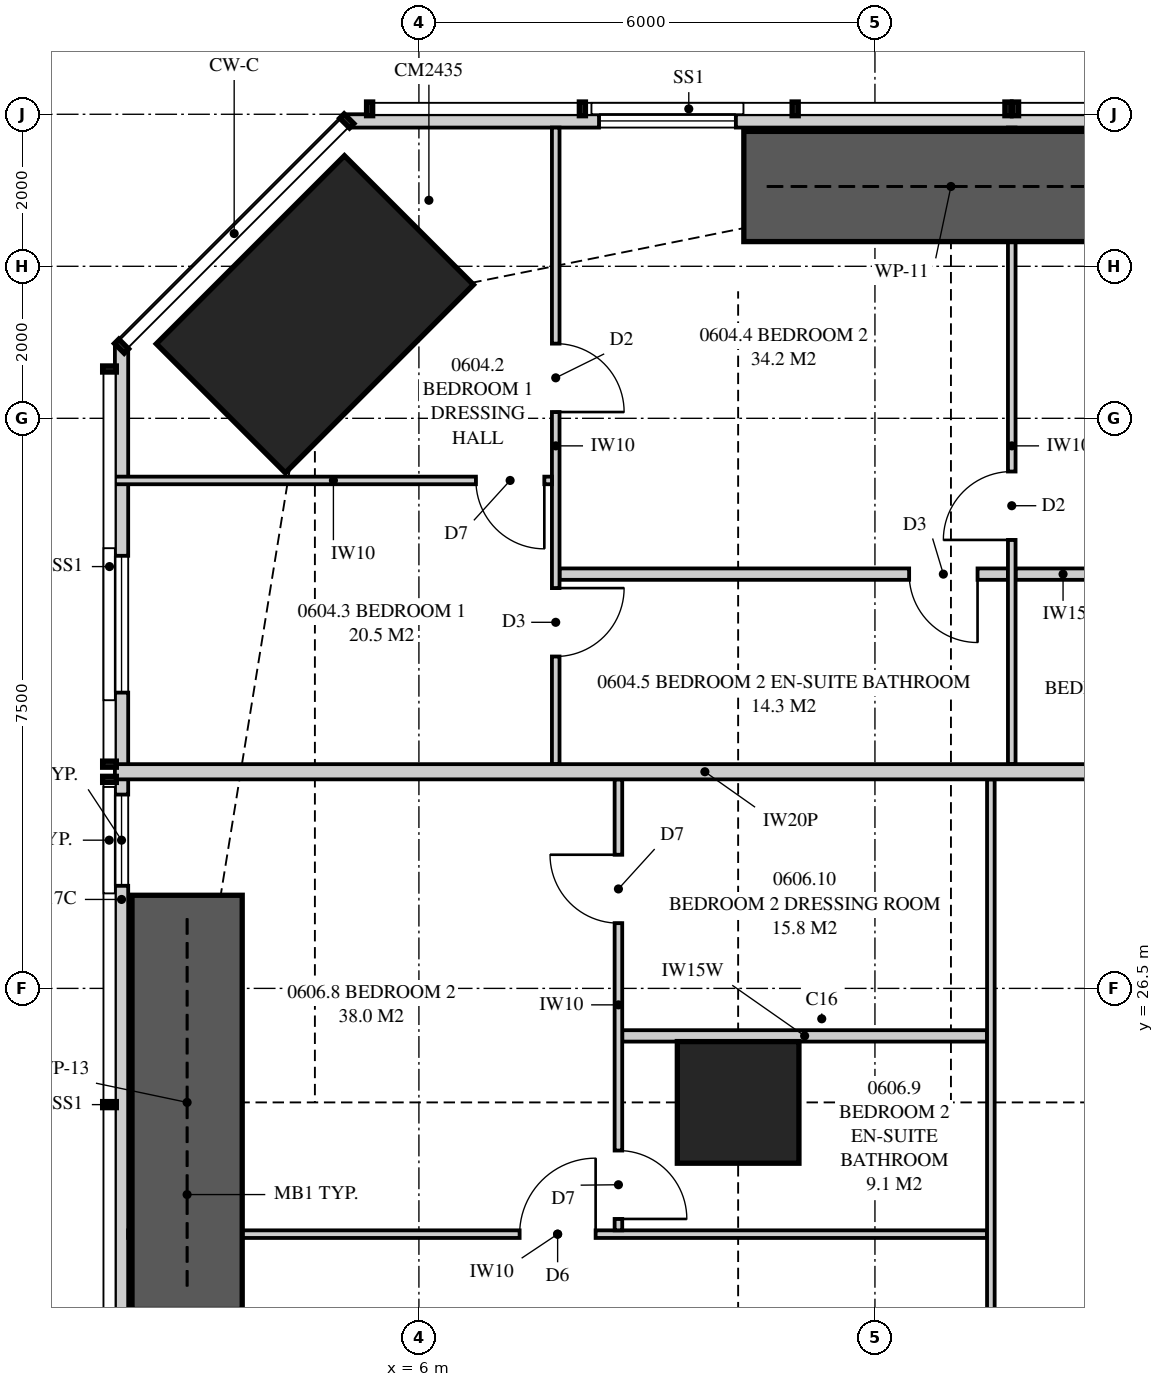
"""IFC4 building model, lengths in metres.
Left out: names, types, materials, properties, quantities, classifications, styles, units other than length and angle.
Written with IfcOpenShell. Run it as: python <this file> out.ifc"""

import sys

from ifc_helpers import new_model, si_unit, direction, frame, frame_2d, origin, origin_2d, place, context, subcontext, project, spatial, polyline, rectangle, outline, extrude, element, fill, save


model = new_model("IFC4")
c1 = context("Model", 3, precision=1e-05, world=origin(), true_north=direction((0.0, 1.0)))
c2 = subcontext(c1, "Body", "Model", "MODEL_VIEW")
j1 = project(units=[si_unit("LENGTHUNIT", "METRE"), si_unit("PLANEANGLEUNIT", "RADIAN")], contexts=[c1])
p1 = place(None, origin())
s1 = spatial("IfcSite", under=j1, at=p1, CompositionType="ELEMENT")
p2 = place(p1, origin())
s2 = spatial("IfcBuilding", under=s1, at=p2, CompositionType="ELEMENT")
p3 = place(p2, frame((0.0, 0.0, 27.7)))
s3 = spatial("IfcBuildingStorey", under=s2, at=p3, CompositionType="ELEMENT", Elevation=27.7)
p4 = place(p3, frame((4.631, 35.369, 0.0), z_axis=(0.0, 0.0, 1.0), x_axis=(0.707106781187, -0.707106781187, 0.0)))
e1 = element("IfcColumn", 1, at=p4, inside=s3, PredefinedType="COLUMN", context=c2, shape_type="SweptSolid", body=[
    extrude(rectangle(XDim=2.4, YDim=3.5, at=origin_2d()), origin(), (0.0, 0.0, 1.0), 3.35),
])
p5 = place(p3, frame((10.2, 25.0, 0.0), z_axis=(0.0, 0.0, 1.0), x_axis=(1.0, 0.0, 0.0)))
e2 = element("IfcColumn", 2, at=p5, inside=s3, PredefinedType="COLUMN", context=c2, shape_type="SweptSolid", body=[
    extrude(rectangle(XDim=1.6, YDim=1.6, at=origin_2d()), origin(), (0.0, 0.0, 1.0), 3.35),
])
p6 = place(p3, frame((26.783, 37.913, 0.0), z_axis=(0.0, 0.0, 1.0), x_axis=(-1.0, 0.0, 0.0)))
e3 = element("IfcWall", 3, at=p6, inside=s3, PredefinedType="SOLIDWALL", context=c2, shape_type="SweptSolid", body=[
    extrude(outline(polyline([(0.0, 0.0), (21.732, 0.0), (21.732, 3.11), (13.987, 3.11), (13.987, 2.15), (13.939, 2.15), (13.939, 3.11), (13.783, 3.11), (13.783, 2.15), (0.0, 2.15), (0.0, 0.0)])), frame((0.0, 0.087, 0.0), z_axis=(0.0, -1.0, 0.0), x_axis=(1.0, 0.0, 0.0)), (0.0, 0.0, 1.0), 0.175),
])
p7 = place(p6, frame((6.258, 0.0, 0.4)))
e4 = element("IfcOpeningElement", 4, at=p7, cuts=e3, PredefinedType="OPENING", context=c2, shape_type="SweptSolid", body=[
    extrude(rectangle(XDim=1.8, YDim=1.7, at=frame_2d((0.9, 0.85))), frame((0.0, 0.097, 0.0), z_axis=(0.0, -1.0, 0.0), x_axis=(1.0, 0.0, 0.0)), (0.0, 0.0, 1.0), 0.195),
])
p8 = place(p6, frame((9.126, 0.0, 0.4)))
e5 = element("IfcOpeningElement", 5, at=p8, cuts=e3, PredefinedType="OPENING", context=c2, shape_type="SweptSolid", body=[
    extrude(rectangle(XDim=1.8, YDim=1.7, at=frame_2d((0.9, 0.85))), frame((0.0, 0.097, 0.0), z_axis=(0.0, -1.0, 0.0), x_axis=(1.0, 0.0, 0.0)), (0.0, 0.0, 1.0), 0.195),
])
p9 = place(p6, frame((16.613, 0.0, 0.4)))
e6 = element("IfcOpeningElement", 6, at=p9, cuts=e3, PredefinedType="OPENING", context=c2, shape_type="SweptSolid", body=[
    extrude(rectangle(XDim=1.8, YDim=1.7, at=frame_2d((0.9, 0.85))), frame((0.0, 0.097, 0.0), z_axis=(0.0, -1.0, 0.0), x_axis=(1.0, 0.0, 0.0)), (0.0, 0.0, 1.0), 0.195),
])
p10 = place(p3, frame((2.087, 34.949, 0.0), z_axis=(0.0, 0.0, 1.0), x_axis=(0.0, -1.0, 0.0)))
e7 = element("IfcWall", 7, at=p10, inside=s3, PredefinedType="SOLIDWALL", context=c2, shape_type="SweptSolid", body=[
    extrude(outline(polyline([(0.0, 0.0), (14.557, 0.0), (14.557, 2.15), (9.949, 2.15), (9.949, 3.11), (9.823, 3.11), (9.823, 2.15), (9.73, 2.15), (9.73, 3.11), (0.0, 3.11), (0.0, 0.0)])), frame((0.0, 0.087, 0.0), z_axis=(0.0, -1.0, 0.0), x_axis=(1.0, 0.0, 0.0)), (0.0, 0.0, 1.0), 0.175),
])
p11 = place(p10, frame((2.757, 0.0, 0.4)))
e8 = element("IfcOpeningElement", 8, at=p11, cuts=e7, PredefinedType="OPENING", context=c2, shape_type="SweptSolid", body=[
    extrude(rectangle(XDim=1.8, YDim=1.7, at=frame_2d((0.9, 0.85))), frame((0.0, 0.097, 0.0), z_axis=(0.0, -1.0, 0.0), x_axis=(1.0, 0.0, 0.0)), (0.0, 0.0, 1.0), 0.195),
])
p12 = place(p10, frame((5.899, 0.0, 0.4)))
e9 = element("IfcOpeningElement", 9, at=p12, cuts=e7, PredefinedType="OPENING", context=c2, shape_type="SweptSolid", body=[
    extrude(rectangle(XDim=1.2, YDim=1.7, at=frame_2d((0.6, 0.85))), frame((0.0, 0.097, 0.0), z_axis=(0.0, -1.0, 0.0), x_axis=(1.0, 0.0, 0.0)), (0.0, 0.0, 1.0), 0.195),
])
p13 = place(p3, frame((7.8, 37.825, 0.0), z_axis=(0.0, 0.0, 1.0), x_axis=(0.0, -1.0, 0.0)))
e10 = element("IfcWall", 10, at=p13, inside=s3, PredefinedType="PARTITIONING", context=c2, shape_type="SweptSolid", body=[
    extrude(outline(polyline([(0.0, 0.0), (8.375, 0.0), (8.375, 3.11), (2.697, 3.11), (2.697, 2.15), (0.943, 2.15), (0.943, 3.11), (0.0, 3.11), (0.0, 0.0)])), frame((0.0, 0.05, 0.0), z_axis=(0.0, -1.0, 0.0), x_axis=(1.0, 0.0, 0.0)), (0.0, 0.0, 1.0), 0.1),
])
p14 = place(p13, frame((2.842, 0.0, 0.0)))
e11 = element("IfcOpeningElement", 11, at=p14, cuts=e10, PredefinedType="OPENING", context=c2, shape_type="SweptSolid", body=[
    extrude(rectangle(XDim=0.9, YDim=2.1, at=frame_2d((0.45, 1.05))), frame((0.0, 0.06, 0.0), z_axis=(0.0, -1.0, 0.0), x_axis=(1.0, 0.0, 0.0)), (0.0, 0.0, 1.0), 0.12),
])
p15 = place(p13, frame((6.059, 0.0, 0.0)))
e12 = element("IfcOpeningElement", 12, at=p15, cuts=e10, PredefinedType="OPENING", context=c2, shape_type="SweptSolid", body=[
    extrude(rectangle(XDim=0.9, YDim=2.1, at=frame_2d((0.45, 1.05))), frame((0.0, 0.06, 0.0), z_axis=(0.0, -1.0, 0.0), x_axis=(1.0, 0.0, 0.0)), (0.0, 0.0, 1.0), 0.12),
])
p16 = place(p3, frame((13.8, 37.825, 0.0), z_axis=(0.0, 0.0, 1.0), x_axis=(0.0, -1.0, 0.0)))
e13 = element("IfcWall", 13, at=p16, inside=s3, PredefinedType="PARTITIONING", context=c2, shape_type="SweptSolid", body=[
    extrude(outline(polyline([(1.635, 2.15), (0.0, 2.15), (0.0, 0.0), (8.375, 0.0), (8.375, 3.11), (1.635, 3.11), (1.635, 2.15)]), holes=[polyline([(1.021, 0.126), (0.529, 0.126), (0.529, 0.919), (1.021, 0.919), (1.021, 0.126)]), polyline([(1.021, 1.231), (0.529, 1.231), (0.529, 2.024), (1.021, 2.024), (1.021, 1.231)])]), frame((0.0, 0.05, 0.0), z_axis=(0.0, -1.0, 0.0), x_axis=(1.0, 0.0, 0.0)), (0.0, 0.0, 1.0), 0.1),
])
p17 = place(p16, frame((4.525, 0.0, 0.0)))
e14 = element("IfcOpeningElement", 14, at=p17, cuts=e13, PredefinedType="OPENING", context=c2, shape_type="SweptSolid", body=[
    extrude(rectangle(XDim=0.9, YDim=2.1, at=frame_2d((0.45, 1.05))), frame((0.0, 0.06, 0.0), z_axis=(0.0, -1.0, 0.0), x_axis=(1.0, 0.0, 0.0)), (0.0, 0.0, 1.0), 0.12),
])
p18 = place(p3, frame((2.0, 33.183, 0.0), z_axis=(0.0, 0.0, 1.0), x_axis=(1.0, 0.0, 0.0)))
e15 = element("IfcWall", 15, at=p18, inside=s3, PredefinedType="PARTITIONING", context=c2, shape_type="SweptSolid", body=[
    extrude(outline(polyline([(0.0, 0.0), (5.75, 0.0), (5.75, 3.11), (3.148, 3.11), (3.148, 2.15), (1.406, 2.15), (1.406, 3.11), (0.0, 3.11), (0.0, 0.0)])), frame((0.0, 0.05, 0.0), z_axis=(0.0, -1.0, 0.0), x_axis=(1.0, 0.0, 0.0)), (0.0, 0.0, 1.0), 0.1),
])
p19 = place(p18, frame((4.75, 0.0, 0.0)))
e16 = element("IfcOpeningElement", 16, at=p19, cuts=e15, PredefinedType="OPENING", context=c2, shape_type="SweptSolid", body=[
    extrude(rectangle(XDim=0.9, YDim=2.1, at=frame_2d((0.45, 1.05))), frame((0.0, 0.06, 0.0), z_axis=(0.0, -1.0, 0.0), x_axis=(1.0, 0.0, 0.0)), (0.0, 0.0, 1.0), 0.12),
])
p20 = place(p3, frame((7.85, 31.95, 0.0), z_axis=(0.0, 0.0, 1.0), x_axis=(1.0, 0.0, 0.0)))
e17 = element("IfcWall", 17, at=p20, inside=s3, PredefinedType="PLUMBINGWALL", context=c2, shape_type="SweptSolid", body=[
    extrude(outline(polyline([(0.0, 0.0), (5.9, 0.0), (5.9, 3.11), (5.462, 3.11), (5.462, 2.541), (4.838, 2.541), (4.838, 3.11), (3.635, 3.11), (3.635, 2.51), (1.065, 2.51), (1.065, 3.11), (0.0, 3.11), (0.0, 0.0)])), frame((0.0, 0.075, 0.0), z_axis=(0.0, -1.0, 0.0), x_axis=(1.0, 0.0, 0.0)), (0.0, 0.0, 1.0), 0.15),
])
p21 = place(p20, frame((4.6, 0.0, 0.0)))
e18 = element("IfcOpeningElement", 18, at=p21, cuts=e17, PredefinedType="OPENING", context=c2, shape_type="SweptSolid", body=[
    extrude(rectangle(XDim=0.9, YDim=2.1, at=frame_2d((0.45, 1.05))), frame((0.0, 0.085, 0.0), z_axis=(0.0, -1.0, 0.0), x_axis=(1.0, 0.0, 0.0)), (0.0, 0.0, 1.0), 0.17),
])
p22 = place(p3, frame((13.85, 31.95, 0.0), z_axis=(0.0, 0.0, 1.0), x_axis=(1.0, 0.0, 0.0)))
e19 = element("IfcWall", 19, at=p22, inside=s3, PredefinedType="PLUMBINGWALL", context=c2, shape_type="SweptSolid", body=[
    extrude(rectangle(XDim=4.2, YDim=0.15, at=frame_2d((2.1, 0.0))), origin(), (0.0, 0.0, 1.0), 3.11),
])
p23 = place(p22, frame((2.9, 0.0, 0.0)))
e20 = element("IfcOpeningElement", 20, at=p23, cuts=e19, PredefinedType="OPENING", context=c2, shape_type="SweptSolid", body=[
    extrude(rectangle(XDim=0.9, YDim=2.1, at=frame_2d((0.45, 1.05))), frame((0.0, 0.085, 0.0), z_axis=(0.0, -1.0, 0.0), x_axis=(1.0, 0.0, 0.0)), (0.0, 0.0, 1.0), 0.17),
])
p24 = place(p3, frame((2.0, 29.35, 0.0), z_axis=(0.0, 0.0, 1.0), x_axis=(1.0, 0.0, 0.0)))
e21 = element("IfcWall", 21, at=p24, inside=s3, PredefinedType="PARTITIONING", context=c2, shape_type="SweptSolid", body=[
    extrude(outline(polyline([(0.0, 0.0), (15.525, 0.0), (15.525, 3.11), (11.337, 3.11), (11.337, 2.541), (10.663, 2.541), (10.663, 3.11), (9.51, 3.11), (9.51, 2.51), (6.89, 2.51), (6.89, 3.11), (2.969, 3.11), (2.969, 2.541), (2.577, 2.541), (2.577, 2.15), (0.733, 2.15), (0.733, 3.11), (0.0, 3.11), (0.0, 0.0)])), frame((0.0, 0.1, 0.0), z_axis=(0.0, -1.0, 0.0), x_axis=(1.0, 0.0, 0.0)), (0.0, 0.0, 1.0), 0.2),
])
p25 = place(p3, frame((13.525, 11.3, 0.0), z_axis=(0.0, 0.0, 1.0), x_axis=(0.0, 1.0, 0.0)))
e22 = element("IfcWall", 22, at=p25, inside=s3, PredefinedType="PARTITIONING", context=c2, shape_type="SweptSolid", body=[
    extrude(outline(polyline([(0.0, 0.0), (17.95, 0.0), (17.95, 3.11), (13.987, 3.11), (13.987, 2.541), (13.413, 2.541), (13.413, 3.11), (1.987, 3.11), (1.987, 2.541), (1.413, 2.541), (1.413, 3.11), (0.0, 3.11), (0.0, 0.0)])), frame((0.0, 0.05, 0.0), z_axis=(0.0, -1.0, 0.0), x_axis=(1.0, 0.0, 0.0)), (0.0, 0.0, 1.0), 0.1),
])
p26 = place(p25, frame((6.7, 0.0, 0.0)))
e23 = element("IfcOpeningElement", 23, at=p26, cuts=e22, PredefinedType="OPENING", context=c2, shape_type="SweptSolid", body=[
    extrude(rectangle(XDim=1.0, YDim=2.1, at=frame_2d((0.5, 1.05))), frame((0.0, 0.06, 0.0), z_axis=(0.0, -1.0, 0.0), x_axis=(1.0, 0.0, 0.0)), (0.0, 0.0, 1.0), 0.12),
])
p27 = place(p3, frame((2.175, 23.267, 0.0), z_axis=(0.0, 0.0, 1.0), x_axis=(1.0, 0.0, 0.0)))
e24 = element("IfcWall", 24, at=p27, inside=s3, PredefinedType="PARTITIONING", context=c2, shape_type="SweptSolid", body=[
    extrude(outline(polyline([(0.529, 2.15), (0.0, 2.15), (0.0, 0.0), (0.529, 0.0), (0.529, 0.274), (1.021, 0.274), (1.021, 0.0), (11.3, 0.0), (11.3, 3.11), (9.285, 3.11), (9.285, 2.51), (6.765, 2.51), (6.765, 3.11), (1.635, 3.11), (1.635, 2.15), (1.021, 2.15), (1.021, 1.876), (0.529, 1.876), (0.529, 2.15)])), frame((0.0, 0.05, 0.0), z_axis=(0.0, -1.0, 0.0), x_axis=(1.0, 0.0, 0.0)), (0.0, 0.0, 1.0), 0.1),
])
p28 = place(p27, frame((5.15, 0.0, 0.0)))
e25 = element("IfcOpeningElement", 25, at=p28, cuts=e24, PredefinedType="OPENING", context=c2, shape_type="SweptSolid", body=[
    extrude(rectangle(XDim=1.0, YDim=2.1, at=frame_2d((0.5, 1.05))), frame((0.0, 0.06, 0.0), z_axis=(0.0, -1.0, 0.0), x_axis=(1.0, 0.0, 0.0)), (0.0, 0.0, 1.0), 0.12),
])
p29 = place(p3, frame((8.625, 23.317, 0.0), z_axis=(0.0, 0.0, 1.0), x_axis=(0.0, 1.0, 0.0)))
e26 = element("IfcWall", 26, at=p29, inside=s3, PredefinedType="PARTITIONING", context=c2, shape_type="SweptSolid", body=[
    extrude(outline(polyline([(0.0, 0.0), (5.933, 0.0), (5.933, 3.11), (1.971, 3.11), (1.971, 2.541), (1.396, 2.541), (1.396, 3.11), (0.0, 3.11), (0.0, 0.0)])), frame((0.0, 0.05, 0.0), z_axis=(0.0, -1.0, 0.0), x_axis=(1.0, 0.0, 0.0)), (0.0, 0.0, 1.0), 0.1),
])
p30 = place(p29, frame((0.15, 0.0, 0.0)))
e27 = element("IfcOpeningElement", 27, at=p30, cuts=e26, PredefinedType="OPENING", context=c2, shape_type="SweptSolid", body=[
    extrude(rectangle(XDim=0.9, YDim=2.1, at=frame_2d((0.45, 1.05))), frame((0.0, 0.06, 0.0), z_axis=(0.0, -1.0, 0.0), x_axis=(1.0, 0.0, 0.0)), (0.0, 0.0, 1.0), 0.12),
])
p31 = place(p29, frame((4.042, 0.0, 0.0)))
e28 = element("IfcOpeningElement", 28, at=p31, cuts=e26, PredefinedType="OPENING", context=c2, shape_type="SweptSolid", body=[
    extrude(rectangle(XDim=0.9, YDim=2.1, at=frame_2d((0.45, 1.05))), frame((0.0, 0.06, 0.0), z_axis=(0.0, -1.0, 0.0), x_axis=(1.0, 0.0, 0.0)), (0.0, 0.0, 1.0), 0.12),
])
p32 = place(p3, frame((8.675, 25.875, 0.0), z_axis=(0.0, 0.0, 1.0), x_axis=(1.0, 0.0, 0.0)))
e29 = element("IfcWall", 29, at=p32, inside=s3, PredefinedType="PLUMBINGWALL", context=c2, shape_type="SweptSolid", body=[
    extrude(outline(polyline([(0.0, 0.0), (4.8, 0.0), (4.8, 3.11), (4.637, 3.11), (4.637, 2.541), (4.013, 2.541), (4.013, 3.11), (2.81, 3.11), (2.81, 2.51), (0.24, 2.51), (0.24, 3.11), (0.0, 3.11), (0.0, 0.0)])), frame((0.0, 0.075, 0.0), z_axis=(0.0, -1.0, 0.0), x_axis=(1.0, 0.0, 0.0)), (0.0, 0.0, 1.0), 0.15),
])
for number, where, z_axis, x_axis in (
    (30, (10.275, 37.05, 0.0), (0.0, 0.0, 1.0), (1.0, 0.0, 0.0)),
    (31, (2.95, 22.275, 0.0), (0.0, 0.0, 1.0), (0.0, 1.0, 0.0)),
):
    element("IfcWall", number, at=place(p3, frame(where, z_axis=z_axis, x_axis=x_axis)), inside=s3, PredefinedType="SHEAR", context=c2, shape_type="SweptSolid", body=[
        extrude(rectangle(XDim=5.45, YDim=1.45, at=frame_2d((2.725, 0.0))), origin(), (0.0, 0.0, 1.0), 3.35),
    ])
p33 = place(p9, origin())
e32 = element("IfcWindow", 32, at=p33, inside=s3, PartitioningType="SINGLE_PANEL", PredefinedType="WINDOW", context=c2, shape_type="SweptSolid", body=[
    extrude(rectangle(XDim=1.8, YDim=1.7, at=frame_2d((0.9, 0.85))), frame((0.0, 0.03, 0.0), z_axis=(0.0, -1.0, 0.0), x_axis=(1.0, 0.0, 0.0)), (0.0, 0.0, 1.0), 0.06),
])
fill(e6, e32)
p34 = place(p11, origin())
e33 = element("IfcWindow", 33, at=p34, inside=s3, PartitioningType="SINGLE_PANEL", PredefinedType="WINDOW", context=c2, shape_type="SweptSolid", body=[
    extrude(rectangle(XDim=1.8, YDim=1.7, at=frame_2d((0.9, 0.85))), frame((0.0, 0.03, 0.0), z_axis=(0.0, -1.0, 0.0), x_axis=(1.0, 0.0, 0.0)), (0.0, 0.0, 1.0), 0.06),
])
fill(e8, e33)
p35 = place(p12, origin())
e34 = element("IfcWindow", 34, at=p35, inside=s3, PartitioningType="SINGLE_PANEL", PredefinedType="WINDOW", context=c2, shape_type="SweptSolid", body=[
    extrude(rectangle(XDim=1.2, YDim=1.7, at=frame_2d((0.6, 0.85))), frame((0.0, 0.03, 0.0), z_axis=(0.0, -1.0, 0.0), x_axis=(1.0, 0.0, 0.0)), (0.0, 0.0, 1.0), 0.06),
])
fill(e9, e34)
p36 = place(p19, frame((0.9, 0.0, 0.0), z_axis=(0.0, 0.0, 1.0), x_axis=(-1.0, 0.0, 0.0)))
e35 = element("IfcDoor", 35, at=p36, inside=s3, OperationType="SINGLE_SWING_LEFT", PredefinedType="DOOR", context=c2, shape_type="SweptSolid", body=[
    extrude(rectangle(XDim=0.9, YDim=2.1, at=frame_2d((0.45, 1.05))), frame((0.0, 0.025, 0.0), z_axis=(0.0, -1.0, 0.0), x_axis=(1.0, 0.0, 0.0)), (0.0, 0.0, 1.0), 0.05),
])
fill(e16, e35)
p37 = place(p14, origin())
e36 = element("IfcDoor", 36, at=p37, inside=s3, OperationType="SINGLE_SWING_RIGHT", PredefinedType="DOOR", context=c2, shape_type="SweptSolid", body=[
    extrude(rectangle(XDim=0.9, YDim=2.1, at=frame_2d((0.45, 1.05))), frame((0.0, 0.025, 0.0), z_axis=(0.0, -1.0, 0.0), x_axis=(1.0, 0.0, 0.0)), (0.0, 0.0, 1.0), 0.05),
])
fill(e11, e36)
p38 = place(p17, frame((0.9, 0.0, 0.0), z_axis=(0.0, 0.0, 1.0), x_axis=(-1.0, 0.0, 0.0)))
e37 = element("IfcDoor", 37, at=p38, inside=s3, OperationType="SINGLE_SWING_LEFT", PredefinedType="DOOR", context=c2, shape_type="SweptSolid", body=[
    extrude(rectangle(XDim=0.9, YDim=2.1, at=frame_2d((0.45, 1.05))), frame((0.0, 0.025, 0.0), z_axis=(0.0, -1.0, 0.0), x_axis=(1.0, 0.0, 0.0)), (0.0, 0.0, 1.0), 0.05),
])
fill(e14, e37)
p39 = place(p21, frame((0.9, 0.0, 0.0), z_axis=(0.0, 0.0, 1.0), x_axis=(-1.0, 0.0, 0.0)))
e38 = element("IfcDoor", 38, at=p39, inside=s3, OperationType="SINGLE_SWING_LEFT", PredefinedType="DOOR", context=c2, shape_type="SweptSolid", body=[
    extrude(rectangle(XDim=0.9, YDim=2.1, at=frame_2d((0.45, 1.05))), frame((0.0, 0.025, 0.0), z_axis=(0.0, -1.0, 0.0), x_axis=(1.0, 0.0, 0.0)), (0.0, 0.0, 1.0), 0.05),
])
fill(e18, e38)
p40 = place(p15, origin())
e39 = element("IfcDoor", 39, at=p40, inside=s3, OperationType="SINGLE_SWING_LEFT", PredefinedType="DOOR", context=c2, shape_type="SweptSolid", body=[
    extrude(rectangle(XDim=0.9, YDim=2.1, at=frame_2d((0.45, 1.05))), frame((0.0, 0.025, 0.0), z_axis=(0.0, -1.0, 0.0), x_axis=(1.0, 0.0, 0.0)), (0.0, 0.0, 1.0), 0.05),
])
fill(e12, e39)
p41 = place(p28, origin())
e40 = element("IfcDoor", 40, at=p41, inside=s3, OperationType="SINGLE_SWING_RIGHT", PredefinedType="DOOR", context=c2, shape_type="SweptSolid", body=[
    extrude(rectangle(XDim=1.0, YDim=2.1, at=frame_2d((0.5, 1.05))), frame((0.0, 0.025, 0.0), z_axis=(0.0, -1.0, 0.0), x_axis=(1.0, 0.0, 0.0)), (0.0, 0.0, 1.0), 0.05),
])
fill(e25, e40)
p42 = place(p30, frame((0.9, 0.0, 0.0), z_axis=(0.0, 0.0, 1.0), x_axis=(-1.0, 0.0, 0.0)))
e41 = element("IfcDoor", 41, at=p42, inside=s3, OperationType="SINGLE_SWING_RIGHT", PredefinedType="DOOR", context=c2, shape_type="SweptSolid", body=[
    extrude(rectangle(XDim=0.9, YDim=2.1, at=frame_2d((0.45, 1.05))), frame((0.0, 0.025, 0.0), z_axis=(0.0, -1.0, 0.0), x_axis=(1.0, 0.0, 0.0)), (0.0, 0.0, 1.0), 0.05),
])
fill(e27, e41)
p43 = place(p31, origin())
e42 = element("IfcDoor", 42, at=p43, inside=s3, OperationType="SINGLE_SWING_RIGHT", PredefinedType="DOOR", context=c2, shape_type="SweptSolid", body=[
    extrude(rectangle(XDim=0.9, YDim=2.1, at=frame_2d((0.45, 1.05))), frame((0.0, 0.025, 0.0), z_axis=(0.0, -1.0, 0.0), x_axis=(1.0, 0.0, 0.0)), (0.0, 0.0, 1.0), 0.05),
])
fill(e28, e42)
save(model, sys.argv[1])
